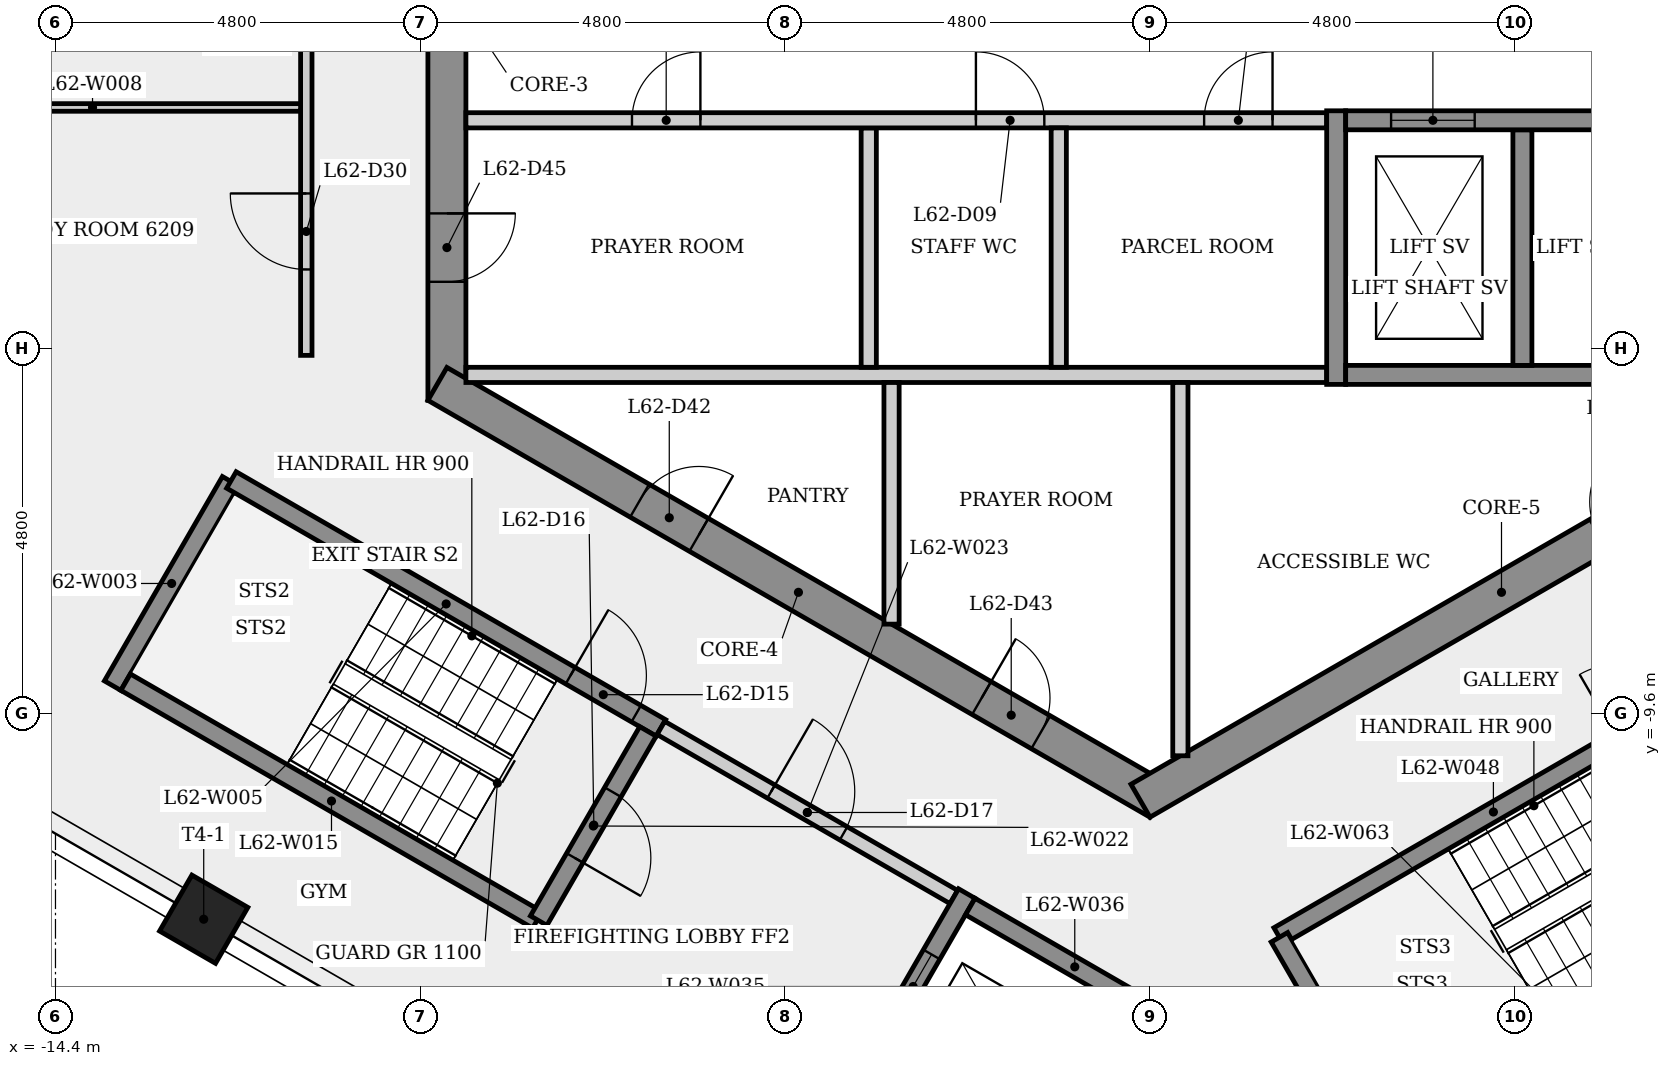
"""IFC4 building model, lengths in metres.
Left out: names, types, materials, properties, quantities, classifications, styles, units other than length and angle.
Written with IfcOpenShell. Run it as: python <this file> out.ifc"""

import sys

from ifc_helpers import new_model, si_unit, direction, frame, frame_2d, origin, origin_2d, place, context, subcontext, project, spatial, rectangle, extrude, element, fill, save


model = new_model("IFC4")
c1 = context("Model", 3, precision=1e-05, world=origin(), true_north=direction((0.0, 1.0)))
c2 = subcontext(c1, "Body", "Model", "MODEL_VIEW")
j1 = project(units=[si_unit("LENGTHUNIT", "METRE"), si_unit("PLANEANGLEUNIT", "RADIAN")], contexts=[c1])
p1 = place(None, origin())
s1 = spatial("IfcSite", under=j1, at=p1, CompositionType="ELEMENT")
p2 = place(p1, origin())
s2 = spatial("IfcBuilding", under=s1, at=p2, CompositionType="ELEMENT")
p3 = place(p2, frame((0.0, 0.0, 232.5)))
s3 = spatial("IfcBuildingStorey", under=s2, at=p3, CompositionType="ELEMENT", Elevation=232.5)
p4 = place(p3, frame((-9.25, 5.485, 0.0), z_axis=(0.0, 0.0, 1.0), x_axis=(0.0, -1.0, 0.0)))
e1 = element("IfcWall", 1, at=p4, inside=s3, PredefinedType="SHEAR", context=c2, shape_type="SweptSolid", body=[
    extrude(rectangle(XDim=10.97, YDim=0.5, at=frame_2d((5.485, 0.0))), origin(), (0.0, 0.0, 1.0), 3.4),
])
p5 = place(p4, frame((8.51, 0.0, 0.0)))
e2 = element("IfcOpeningElement", 2, at=p5, cuts=e1, PredefinedType="OPENING", context=c2, shape_type="SweptSolid", body=[
    extrude(rectangle(XDim=0.9, YDim=2.1, at=frame_2d((0.45, 1.05))), frame((0.0, 0.26, 0.0), z_axis=(0.0, -1.0, 0.0), x_axis=(1.0, 0.0, 0.0)), (0.0, 0.0, 1.0), 0.52),
])
p6 = place(p4, frame((4.685, 0.0, 0.0)))
e3 = element("IfcOpeningElement", 3, at=p6, cuts=e1, PredefinedType="OPENING", context=c2, shape_type="SweptSolid", body=[
    extrude(rectangle(XDim=1.6, YDim=2.1, at=frame_2d((0.8, 1.05))), frame((0.0, 0.26, 0.0), z_axis=(0.0, -1.0, 0.0), x_axis=(1.0, 0.0, 0.0)), (0.0, 0.0, 1.0), 0.52),
])
p7 = place(p3, frame((-9.375, -5.268, 0.0), z_axis=(0.0, 0.0, 1.0), x_axis=(0.866023993627, -0.500002442456, 0.0)))
e4 = element("IfcWall", 4, at=p7, inside=s3, PredefinedType="SHEAR", context=c2, shape_type="SweptSolid", body=[
    extrude(rectangle(XDim=10.97, YDim=0.5, at=frame_2d((5.485, 0.0))), origin(), (0.0, 0.0, 1.0), 3.4),
])
p8 = place(p7, frame((3.073, 0.0, 0.0)))
e5 = element("IfcOpeningElement", 5, at=p8, cuts=e4, PredefinedType="OPENING", context=c2, shape_type="SweptSolid", body=[
    extrude(rectangle(XDim=0.9, YDim=2.1, at=frame_2d((0.45, 1.05))), frame((0.0, 0.26, 0.0), z_axis=(0.0, -1.0, 0.0), x_axis=(1.0, 0.0, 0.0)), (0.0, 0.0, 1.0), 0.52),
])
p9 = place(p7, frame((8.267, 0.0, 0.0)))
e6 = element("IfcOpeningElement", 6, at=p9, cuts=e4, PredefinedType="OPENING", context=c2, shape_type="SweptSolid", body=[
    extrude(rectangle(XDim=0.9, YDim=2.1, at=frame_2d((0.45, 1.05))), frame((0.0, 0.26, 0.0), z_axis=(0.0, -1.0, 0.0), x_axis=(1.0, 0.0, 0.0)), (0.0, 0.0, 1.0), 0.52),
])
p10 = place(p3, frame((-0.125, -10.753, 0.0), z_axis=(0.0, 0.0, 1.0), x_axis=(0.866023993627, 0.500002442456, 0.0)))
e7 = element("IfcWall", 7, at=p10, inside=s3, PredefinedType="SHEAR", context=c2, shape_type="SweptSolid", body=[
    extrude(rectangle(XDim=10.97, YDim=0.5, at=frame_2d((5.485, 0.0))), origin(), (0.0, 0.0, 1.0), 3.4),
])
p11 = place(p10, frame((6.964, 0.0, 0.0)))
e8 = element("IfcOpeningElement", 8, at=p11, cuts=e7, PredefinedType="OPENING", context=c2, shape_type="SweptSolid", body=[
    extrude(rectangle(XDim=0.9, YDim=2.1, at=frame_2d((0.45, 1.05))), frame((0.0, 0.26, 0.0), z_axis=(0.0, -1.0, 0.0), x_axis=(1.0, 0.0, 0.0)), (0.0, 0.0, 1.0), 0.52),
])
p12 = place(p3, frame((-12.45, -12.312, 0.0), z_axis=(0.0, 0.0, 1.0), x_axis=(-0.5, -0.866025403784, 0.0)))
e9 = element("IfcColumn", 9, at=p12, inside=s3, PredefinedType="COLUMN", context=c2, shape_type="SweptSolid", body=[
    extrude(rectangle(XDim=0.85, YDim=0.85, at=origin_2d()), origin(), (0.0, 0.0, 1.0), 3.4),
])
p13 = place(p3, frame((-13.648, -9.239, 0.0), z_axis=(0.0, 0.0, 1.0), x_axis=(0.500003782172, 0.866023220135, 0.0)))
e10 = element("IfcWall", 10, at=p13, inside=s3, PredefinedType="SHEAR", context=c2, shape_type="SweptSolid", body=[
    extrude(rectangle(XDim=3.105, YDim=0.25, at=frame_2d((1.552, 0.0))), origin(), (0.0, 0.0, 1.0), 3.05),
])
p14 = place(p3, frame((-12.085, -6.532, 0.0), z_axis=(0.0, 0.0, 1.0), x_axis=(0.866031063448, -0.499990197047, 0.0)))
e11 = element("IfcWall", 11, at=p14, inside=s3, PredefinedType="SHEAR", context=c2, shape_type="SweptSolid", body=[
    extrude(rectangle(XDim=6.525, YDim=0.25, at=frame_2d((3.263, 0.0))), origin(), (0.0, 0.0, 1.0), 3.05),
])
p15 = place(p14, frame((5.15, 0.0, 0.0)))
e12 = element("IfcOpeningElement", 12, at=p15, cuts=e11, PredefinedType="OPENING", context=c2, shape_type="SweptSolid", body=[
    extrude(rectangle(XDim=1.0, YDim=2.1, at=frame_2d((0.5, 1.05))), frame((0.0, 0.135, 0.0), z_axis=(0.0, -1.0, 0.0), x_axis=(1.0, 0.0, 0.0)), (0.0, 0.0, 1.0), 0.27),
])
p16 = place(p3, frame((-11.1, -4.893, 0.0), z_axis=(0.0, 0.0, 1.0), x_axis=(0.0, 1.0, 0.0)))
e13 = element("IfcWall", 13, at=p16, inside=s3, PredefinedType="PARTITIONING", context=c2, shape_type="SweptSolid", body=[
    extrude(rectangle(XDim=9.861, YDim=0.15, at=frame_2d((4.931, 0.0))), origin(), (0.0, 0.0, 1.0), 3.05),
])
p17 = place(p16, frame((7.655, 0.0, 0.0)))
e14 = element("IfcOpeningElement", 14, at=p17, cuts=e13, PredefinedType="OPENING", context=c2, shape_type="SweptSolid", body=[
    extrude(rectangle(XDim=1.0, YDim=2.1, at=frame_2d((0.5, 1.05))), frame((0.0, 0.085, 0.0), z_axis=(0.0, -1.0, 0.0), x_axis=(1.0, 0.0, 0.0)), (0.0, 0.0, 1.0), 0.17),
])
p18 = place(p16, frame((4.393, 0.0, 0.0)))
e15 = element("IfcOpeningElement", 15, at=p18, cuts=e13, PredefinedType="OPENING", context=c2, shape_type="SweptSolid", body=[
    extrude(rectangle(XDim=1.0, YDim=2.1, at=frame_2d((0.5, 1.05))), frame((0.0, 0.085, 0.0), z_axis=(0.0, -1.0, 0.0), x_axis=(1.0, 0.0, 0.0)), (0.0, 0.0, 1.0), 0.17),
])
p19 = place(p16, frame((1.131, 0.0, 0.0)))
e16 = element("IfcOpeningElement", 16, at=p19, cuts=e13, PredefinedType="OPENING", context=c2, shape_type="SweptSolid", body=[
    extrude(rectangle(XDim=1.0, YDim=2.1, at=frame_2d((0.5, 1.05))), frame((0.0, 0.085, 0.0), z_axis=(0.0, -1.0, 0.0), x_axis=(1.0, 0.0, 0.0)), (0.0, 0.0, 1.0), 0.17),
])
p20 = place(p3, frame((-11.175, -1.631, 0.0), z_axis=(0.0, 0.0, 1.0), x_axis=(-1.0, 0.0, 0.0)))
e17 = element("IfcWall", 17, at=p20, inside=s3, PredefinedType="PARTITIONING", context=c2, shape_type="SweptSolid", body=[
    extrude(rectangle(XDim=5.475, YDim=0.1, at=frame_2d((2.738, 0.0))), origin(), (0.0, 0.0, 1.0), 3.05),
])
p21 = place(p3, frame((-9.0, -5.15, 0.0), z_axis=(0.0, 0.0, 1.0), x_axis=(1.0, 0.0, 0.0)))
e18 = element("IfcWall", 18, at=p21, inside=s3, PredefinedType="PARTITIONING", context=c2, shape_type="SweptSolid", body=[
    extrude(rectangle(XDim=11.325, YDim=0.2, at=frame_2d((5.663, 0.0))), origin(), (0.0, 0.0, 1.0), 3.05),
])
p22 = place(p3, frame((-8.06, -12.321, 0.0), z_axis=(0.0, 0.0, 1.0), x_axis=(-0.866029591389, 0.499992746786, 0.0)))
e19 = element("IfcWall", 19, at=p22, inside=s3, PredefinedType="SHEAR", context=c2, shape_type="SweptSolid", body=[
    extrude(rectangle(XDim=6.255, YDim=0.25, at=frame_2d((3.127, 0.0))), origin(), (0.0, 0.0, 1.0), 3.05),
])
p23 = place(p3, frame((-6.605, -9.841, 0.0), z_axis=(0.0, 0.0, 1.0), x_axis=(-0.500011588718, -0.866018712932, 0.0)))
e20 = element("IfcWall", 20, at=p23, inside=s3, PredefinedType="SHEAR", context=c2, shape_type="SweptSolid", body=[
    extrude(rectangle(XDim=2.875, YDim=0.25, at=frame_2d((1.438, 0.0))), origin(), (0.0, 0.0, 1.0), 3.05),
])
p24 = place(p23, frame((0.923, 0.0, 0.0)))
e21 = element("IfcOpeningElement", 21, at=p24, cuts=e20, PredefinedType="OPENING", context=c2, shape_type="SweptSolid", body=[
    extrude(rectangle(XDim=1.0, YDim=2.1, at=frame_2d((0.5, 1.05))), frame((0.0, 0.135, 0.0), z_axis=(0.0, -1.0, 0.0), x_axis=(1.0, 0.0, 0.0)), (0.0, 0.0, 1.0), 0.27),
])
p25 = place(p3, frame((-6.435, -9.795, 0.0), z_axis=(0.0, 0.0, 1.0), x_axis=(0.866012907634, -0.500021643343, 0.0)))
e22 = element("IfcWall", 22, at=p25, inside=s3, PredefinedType="PARTITIONING", context=c2, shape_type="SweptSolid", body=[
    extrude(rectangle(XDim=4.45, YDim=0.2, at=frame_2d((2.225, 0.0))), origin(), (0.0, 0.0, 1.0), 3.05),
])
p26 = place(p25, frame((1.675, 0.0, 0.0)))
e23 = element("IfcOpeningElement", 23, at=p26, cuts=e22, PredefinedType="OPENING", context=c2, shape_type="SweptSolid", body=[
    extrude(rectangle(XDim=1.1, YDim=2.1, at=frame_2d((0.55, 1.05))), frame((0.0, 0.11, 0.0), z_axis=(0.0, -1.0, 0.0), x_axis=(1.0, 0.0, 0.0)), (0.0, 0.0, 1.0), 0.22),
])
p27 = place(p3, frame((-3.7, -1.9, 0.0), z_axis=(0.0, 0.0, 1.0), x_axis=(0.0, -1.0, 0.0)))
e24 = element("IfcWall", 24, at=p27, inside=s3, PredefinedType="PARTITIONING", context=c2, shape_type="SweptSolid", body=[
    extrude(rectangle(XDim=3.15, YDim=0.2, at=frame_2d((1.575, 0.0))), origin(), (0.0, 0.0, 1.0), 3.05),
])
p28 = place(p3, frame((-9.0, -1.8, 0.0), z_axis=(0.0, 0.0, 1.0), x_axis=(1.0, 0.0, 0.0)))
e25 = element("IfcWall", 25, at=p28, inside=s3, PredefinedType="PARTITIONING", context=c2, shape_type="SweptSolid", body=[
    extrude(rectangle(XDim=11.325, YDim=0.2, at=frame_2d((5.663, 0.0))), origin(), (0.0, 0.0, 1.0), 3.05),
])
p29 = place(p28, frame((2.185, 0.0, 0.0)))
e26 = element("IfcOpeningElement", 26, at=p29, cuts=e25, PredefinedType="OPENING", context=c2, shape_type="SweptSolid", body=[
    extrude(rectangle(XDim=0.9, YDim=2.1, at=frame_2d((0.45, 1.05))), frame((0.0, 0.11, 0.0), z_axis=(0.0, -1.0, 0.0), x_axis=(1.0, 0.0, 0.0)), (0.0, 0.0, 1.0), 0.22),
])
p30 = place(p28, frame((6.71, 0.0, 0.0)))
e27 = element("IfcOpeningElement", 27, at=p30, cuts=e25, PredefinedType="OPENING", context=c2, shape_type="SweptSolid", body=[
    extrude(rectangle(XDim=0.9, YDim=2.1, at=frame_2d((0.45, 1.05))), frame((0.0, 0.11, 0.0), z_axis=(0.0, -1.0, 0.0), x_axis=(1.0, 0.0, 0.0)), (0.0, 0.0, 1.0), 0.22),
])
p31 = place(p28, frame((9.713, 0.0, 0.0)))
e28 = element("IfcOpeningElement", 28, at=p31, cuts=e25, PredefinedType="OPENING", context=c2, shape_type="SweptSolid", body=[
    extrude(rectangle(XDim=0.9, YDim=2.1, at=frame_2d((0.45, 1.05))), frame((0.0, 0.11, 0.0), z_axis=(0.0, -1.0, 0.0), x_axis=(1.0, 0.0, 0.0)), (0.0, 0.0, 1.0), 0.22),
])
p32 = place(p3, frame((-3.4, -5.25, 0.0), z_axis=(0.0, 0.0, 1.0), x_axis=(0.0, -1.0, 0.0)))
e29 = element("IfcWall", 29, at=p32, inside=s3, PredefinedType="PARTITIONING", context=c2, shape_type="SweptSolid", body=[
    extrude(rectangle(XDim=3.179, YDim=0.2, at=frame_2d((1.59, 0.0))), origin(), (0.0, 0.0, 1.0), 3.05),
])
p33 = place(p3, frame((-2.41, -11.974, 0.0), z_axis=(0.0, 0.0, 1.0), x_axis=(-0.49998675294, -0.866033051843, 0.0)))
e30 = element("IfcWall", 30, at=p33, inside=s3, PredefinedType="SHEAR", context=c2, shape_type="SweptSolid", body=[
    extrude(rectangle(XDim=2.825, YDim=0.25, at=frame_2d((1.413, 0.0))), origin(), (0.0, 0.0, 1.0), 3.05),
])
p34 = place(p33, frame((0.926, 0.0, 0.0)))
e31 = element("IfcOpeningElement", 31, at=p34, cuts=e30, PredefinedType="OPENING", context=c2, shape_type="SweptSolid", body=[
    extrude(rectangle(XDim=1.1, YDim=2.1, at=frame_2d((0.55, 1.05))), frame((0.0, 0.135, 0.0), z_axis=(0.0, -1.0, 0.0), x_axis=(1.0, 0.0, 0.0)), (0.0, 0.0, 1.0), 0.27),
])
p35 = place(p3, frame((-2.364, -12.145, 0.0), z_axis=(0.0, 0.0, 1.0), x_axis=(0.866048579423, -0.499959856469, 0.0)))
e32 = element("IfcWall", 32, at=p35, inside=s3, PredefinedType="SHEAR", context=c2, shape_type="SweptSolid", body=[
    extrude(rectangle(XDim=3.175, YDim=0.25, at=frame_2d((1.587, 0.0))), origin(), (0.0, 0.0, 1.0), 3.4),
])
p36 = place(p3, frame((-1.2, -1.9, 0.0), z_axis=(0.0, 0.0, 1.0), x_axis=(0.0, -1.0, 0.0)))
e33 = element("IfcWall", 33, at=p36, inside=s3, PredefinedType="PARTITIONING", context=c2, shape_type="SweptSolid", body=[
    extrude(rectangle(XDim=3.15, YDim=0.2, at=frame_2d((1.575, 0.0))), origin(), (0.0, 0.0, 1.0), 3.05),
])
p37 = place(p3, frame((0.4, -5.25, 0.0), z_axis=(0.0, 0.0, 1.0), x_axis=(0.0, -1.0, 0.0)))
e34 = element("IfcWall", 34, at=p37, inside=s3, PredefinedType="PARTITIONING", context=c2, shape_type="SweptSolid", body=[
    extrude(rectangle(XDim=4.911, YDim=0.2, at=frame_2d((2.456, 0.0))), origin(), (0.0, 0.0, 1.0), 3.05),
])
p38 = place(p3, frame((1.693, -12.532, 0.0), z_axis=(0.0, 0.0, 1.0), x_axis=(0.866031063448, 0.499990197047, 0.0)))
e35 = element("IfcWall", 35, at=p38, inside=s3, PredefinedType="SHEAR", context=c2, shape_type="SweptSolid", body=[
    extrude(rectangle(XDim=6.525, YDim=0.25, at=frame_2d((3.263, 0.0))), origin(), (0.0, 0.0, 1.0), 3.05),
])
p39 = place(p38, frame((5.15, 0.0, 0.0)))
e36 = element("IfcOpeningElement", 36, at=p39, cuts=e35, PredefinedType="OPENING", context=c2, shape_type="SweptSolid", body=[
    extrude(rectangle(XDim=1.0, YDim=2.1, at=frame_2d((0.5, 1.05))), frame((0.0, 0.135, 0.0), z_axis=(0.0, -1.0, 0.0), x_axis=(1.0, 0.0, 0.0)), (0.0, 0.0, 1.0), 0.27),
])
p40 = place(p3, frame((2.45, -5.275, 0.0), z_axis=(0.0, 0.0, 1.0), x_axis=(0.0, 1.0, 0.0)))
e37 = element("IfcWall", 37, at=p40, inside=s3, PredefinedType="SHEAR", context=c2, shape_type="SweptSolid", body=[
    extrude(rectangle(XDim=3.6, YDim=0.25, at=frame_2d((1.8, 0.0))), origin(), (0.0, 0.0, 1.0), 3.05),
])
p41 = place(p3, frame((3.256, -15.239, 0.0), z_axis=(0.0, 0.0, 1.0), x_axis=(-0.500003782172, 0.866023220135, 0.0)))
e38 = element("IfcWall", 38, at=p41, inside=s3, PredefinedType="SHEAR", context=c2, shape_type="SweptSolid", body=[
    extrude(rectangle(XDim=3.105, YDim=0.25, at=frame_2d((1.552, 0.0))), origin(), (0.0, 0.0, 1.0), 3.05),
])
p42 = place(p3, frame((2.575, -5.15, 0.0), z_axis=(0.0, 0.0, 1.0), x_axis=(1.0, 0.0, 0.0)))
e39 = element("IfcWall", 39, at=p42, inside=s3, PredefinedType="SHEAR", context=c2, shape_type="SweptSolid", body=[
    extrude(rectangle(XDim=4.9, YDim=0.25, at=frame_2d((2.45, 0.0))), origin(), (0.0, 0.0, 1.0), 3.05),
])
p43 = place(p3, frame((4.9, -1.925, 0.0), z_axis=(0.0, 0.0, 1.0), x_axis=(0.0, -1.0, 0.0)))
e40 = element("IfcWall", 40, at=p43, inside=s3, PredefinedType="SHEAR", context=c2, shape_type="SweptSolid", body=[
    extrude(rectangle(XDim=3.1, YDim=0.25, at=frame_2d((1.55, 0.0))), origin(), (0.0, 0.0, 1.0), 3.4),
])
p44 = place(p3, frame((2.575, -1.8, 0.0), z_axis=(0.0, 0.0, 1.0), x_axis=(1.0, 0.0, 0.0)))
e41 = element("IfcWall", 41, at=p44, inside=s3, PredefinedType="SHEAR", context=c2, shape_type="SweptSolid", body=[
    extrude(rectangle(XDim=4.9, YDim=0.25, at=frame_2d((2.45, 0.0))), origin(), (0.0, 0.0, 1.0), 3.05),
])
p45 = place(p44, frame((0.597, 0.0, 0.0)))
e42 = element("IfcOpeningElement", 42, at=p45, cuts=e41, PredefinedType="OPENING", context=c2, shape_type="SweptSolid", body=[
    extrude(rectangle(XDim=1.1, YDim=2.1, at=frame_2d((0.55, 1.05))), frame((0.0, 0.135, 0.0), z_axis=(0.0, -1.0, 0.0), x_axis=(1.0, 0.0, 0.0)), (0.0, 0.0, 1.0), 0.27),
])
p46 = place(p3, frame((7.073, -12.891, 0.0), z_axis=(0.0, 0.0, 1.0), x_axis=(-0.866023145199, -0.500003911965, 0.0)))
e43 = element("IfcWall", 43, at=p46, inside=s3, PredefinedType="SHEAR", context=c2, shape_type="SweptSolid", body=[
    extrude(rectangle(XDim=4.355, YDim=0.25, at=frame_2d((2.177, 0.0))), origin(), (0.0, 0.0, 1.0), 3.05),
])
p47 = place(p45, origin())
e44 = element("IfcDoor", 44, at=p47, inside=s3, OperationType="SLIDING_TO_LEFT", PredefinedType="DOOR", context=c2, shape_type="SweptSolid", body=[
    extrude(rectangle(XDim=1.1, YDim=2.1, at=frame_2d((0.55, 1.05))), frame((0.0, 0.025, 0.0), z_axis=(0.0, -1.0, 0.0), x_axis=(1.0, 0.0, 0.0)), (0.0, 0.0, 1.0), 0.05),
])
fill(e42, e44)
p48 = place(p29, origin())
e45 = element("IfcDoor", 45, at=p48, inside=s3, OperationType="SINGLE_SWING_RIGHT", PredefinedType="DOOR", context=c2, shape_type="SweptSolid", body=[
    extrude(rectangle(XDim=0.9, YDim=2.1, at=frame_2d((0.45, 1.05))), frame((0.0, 0.025, 0.0), z_axis=(0.0, -1.0, 0.0), x_axis=(1.0, 0.0, 0.0)), (0.0, 0.0, 1.0), 0.05),
])
fill(e26, e45)
p49 = place(p30, origin())
e46 = element("IfcDoor", 46, at=p49, inside=s3, OperationType="SINGLE_SWING_LEFT", PredefinedType="DOOR", context=c2, shape_type="SweptSolid", body=[
    extrude(rectangle(XDim=0.9, YDim=2.1, at=frame_2d((0.45, 1.05))), frame((0.0, 0.025, 0.0), z_axis=(0.0, -1.0, 0.0), x_axis=(1.0, 0.0, 0.0)), (0.0, 0.0, 1.0), 0.05),
])
fill(e27, e46)
p50 = place(p31, origin())
e47 = element("IfcDoor", 47, at=p50, inside=s3, OperationType="SINGLE_SWING_RIGHT", PredefinedType="DOOR", context=c2, shape_type="SweptSolid", body=[
    extrude(rectangle(XDim=0.9, YDim=2.1, at=frame_2d((0.45, 1.05))), frame((0.0, 0.025, 0.0), z_axis=(0.0, -1.0, 0.0), x_axis=(1.0, 0.0, 0.0)), (0.0, 0.0, 1.0), 0.05),
])
fill(e28, e47)
p51 = place(p15, origin())
e48 = element("IfcDoor", 48, at=p51, inside=s3, OperationType="SINGLE_SWING_LEFT", PredefinedType="DOOR", context=c2, shape_type="SweptSolid", body=[
    extrude(rectangle(XDim=1.0, YDim=2.1, at=frame_2d((0.5, 1.05))), frame((0.0, 0.025, 0.0), z_axis=(0.0, -1.0, 0.0), x_axis=(1.0, 0.0, 0.0)), (0.0, 0.0, 1.0), 0.05),
])
fill(e12, e48)
p52 = place(p24, origin())
e49 = element("IfcDoor", 49, at=p52, inside=s3, OperationType="SINGLE_SWING_RIGHT", PredefinedType="DOOR", context=c2, shape_type="SweptSolid", body=[
    extrude(rectangle(XDim=1.0, YDim=2.1, at=frame_2d((0.5, 1.05))), frame((0.0, 0.025, 0.0), z_axis=(0.0, -1.0, 0.0), x_axis=(1.0, 0.0, 0.0)), (0.0, 0.0, 1.0), 0.05),
])
fill(e21, e49)
p53 = place(p26, origin())
e50 = element("IfcDoor", 50, at=p53, inside=s3, OperationType="SINGLE_SWING_LEFT", PredefinedType="DOOR", context=c2, shape_type="SweptSolid", body=[
    extrude(rectangle(XDim=1.1, YDim=2.1, at=frame_2d((0.55, 1.05))), frame((0.0, 0.025, 0.0), z_axis=(0.0, -1.0, 0.0), x_axis=(1.0, 0.0, 0.0)), (0.0, 0.0, 1.0), 0.05),
])
fill(e23, e50)
p54 = place(p34, origin())
e51 = element("IfcDoor", 51, at=p54, inside=s3, OperationType="SLIDING_TO_LEFT", PredefinedType="DOOR", context=c2, shape_type="SweptSolid", body=[
    extrude(rectangle(XDim=1.1, YDim=2.1, at=frame_2d((0.55, 1.05))), frame((0.0, 0.025, 0.0), z_axis=(0.0, -1.0, 0.0), x_axis=(1.0, 0.0, 0.0)), (0.0, 0.0, 1.0), 0.05),
])
fill(e31, e51)
p55 = place(p19, origin())
e52 = element("IfcDoor", 52, at=p55, inside=s3, OperationType="SINGLE_SWING_RIGHT", PredefinedType="DOOR", context=c2, shape_type="SweptSolid", body=[
    extrude(rectangle(XDim=1.0, YDim=2.1, at=frame_2d((0.5, 1.05))), frame((0.0, 0.025, 0.0), z_axis=(0.0, -1.0, 0.0), x_axis=(1.0, 0.0, 0.0)), (0.0, 0.0, 1.0), 0.05),
])
fill(e16, e52)
p56 = place(p8, origin())
e53 = element("IfcDoor", 53, at=p56, inside=s3, OperationType="SINGLE_SWING_RIGHT", PredefinedType="DOOR", context=c2, shape_type="SweptSolid", body=[
    extrude(rectangle(XDim=0.9, YDim=2.1, at=frame_2d((0.45, 1.05))), frame((0.0, 0.025, 0.0), z_axis=(0.0, -1.0, 0.0), x_axis=(1.0, 0.0, 0.0)), (0.0, 0.0, 1.0), 0.05),
])
fill(e5, e53)
p57 = place(p9, origin())
e54 = element("IfcDoor", 54, at=p57, inside=s3, OperationType="SINGLE_SWING_LEFT", PredefinedType="DOOR", context=c2, shape_type="SweptSolid", body=[
    extrude(rectangle(XDim=0.9, YDim=2.1, at=frame_2d((0.45, 1.05))), frame((0.0, 0.025, 0.0), z_axis=(0.0, -1.0, 0.0), x_axis=(1.0, 0.0, 0.0)), (0.0, 0.0, 1.0), 0.05),
])
fill(e6, e54)
p58 = place(p5, origin())
e55 = element("IfcDoor", 55, at=p58, inside=s3, OperationType="SINGLE_SWING_LEFT", PredefinedType="DOOR", context=c2, shape_type="SweptSolid", body=[
    extrude(rectangle(XDim=0.9, YDim=2.1, at=frame_2d((0.45, 1.05))), frame((0.0, 0.025, 0.0), z_axis=(0.0, -1.0, 0.0), x_axis=(1.0, 0.0, 0.0)), (0.0, 0.0, 1.0), 0.05),
])
fill(e2, e55)
save(model, sys.argv[1])
